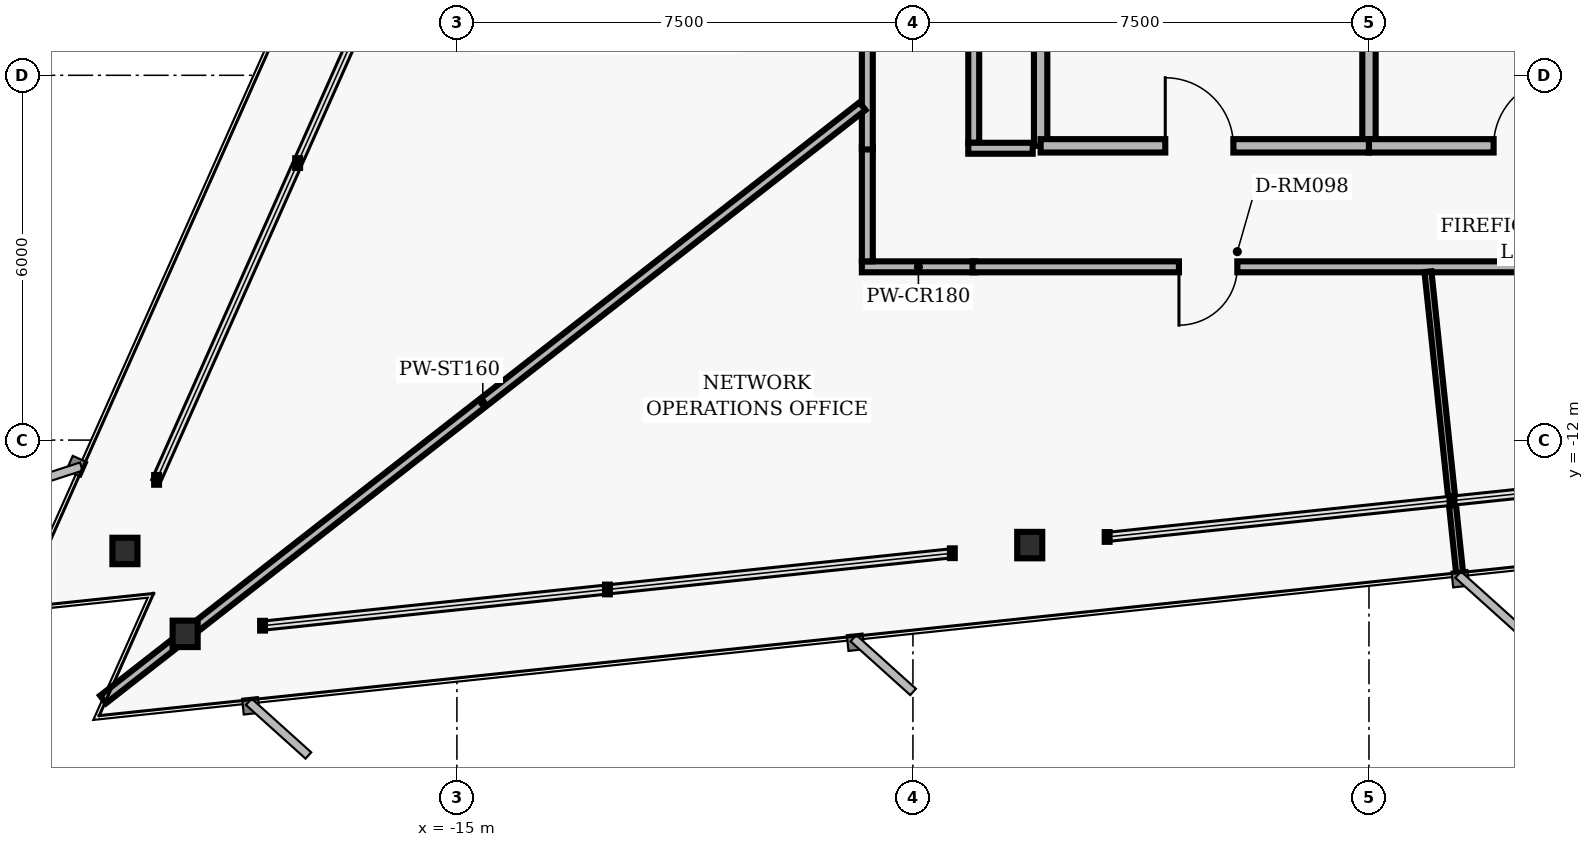
"""IFC4 building model, lengths in metres.
Left out: names, types, materials, properties, quantities, classifications, styles, units other than length and angle.
Written with IfcOpenShell. Run it as: python <this file> out.ifc"""

import sys

from ifc_helpers import new_model, si_unit, direction, frame, frame_2d, origin, origin_2d, place, context, subcontext, project, spatial, rectangle, i_section, extrude, element, fill, save


model = new_model("IFC4")
c1 = context("Model", 3, precision=1e-05, world=origin(), true_north=direction((0.0, 1.0)))
c2 = subcontext(c1, "Body", "Model", "MODEL_VIEW")
j1 = project(units=[si_unit("LENGTHUNIT", "METRE"), si_unit("PLANEANGLEUNIT", "RADIAN")], contexts=[c1])
p1 = place(None, origin())
s1 = spatial("IfcSite", under=j1, at=p1, CompositionType="ELEMENT")
p2 = place(p1, origin())
s2 = spatial("IfcBuilding", under=s1, at=p2, CompositionType="ELEMENT")
p3 = place(p2, frame((0.0, 0.0, 107.68)))
s3 = spatial("IfcBuildingStorey", under=s2, at=p3, CompositionType="ELEMENT", Elevation=107.68)
for number, where, z_axis, x_axis in (
    (1, (-20.46, -13.823, 0.0), (0.0, 0.0, 1.0), (1.0, 0.0, 0.0)),
    (2, (-19.469, -15.187, 0.0), (0.0, 0.0, 1.0), (1.0, 0.0, 0.0)),
    (3, (-5.579, -13.727, 0.0), (0.0, 0.0, 1.0), (1.0, 0.0, 0.0)),
):
    element("IfcColumn", number, at=place(p3, frame(where, z_axis=z_axis, x_axis=x_axis)), inside=s3, PredefinedType="COLUMN", context=c2, shape_type="SweptSolid", body=[
        extrude(i_section(OverallWidth=0.412, OverallDepth=0.435, WebThickness=0.036, FlangeThickness=0.057, FilletRadius=0.022, at=origin_2d()), origin(), (0.0, 0.0, 1.0), 3.04),
    ])
p4 = place(p3, frame((-5.4, -7.16, 0.0), z_axis=(0.0, 0.0, 1.0), x_axis=(0.0, 1.0, 0.0)))
e4 = element("IfcWall", 4, at=p4, inside=s3, PredefinedType="PARTITIONING", context=c2, shape_type="SweptSolid", body=[
    extrude(rectangle(XDim=2.71, YDim=0.22, at=frame_2d((1.355, 0.0))), origin(), (0.0, 0.0, 1.0), 2.763),
])
p5 = place(p3, frame((0.0, -7.16, 0.0), z_axis=(0.0, 0.0, 1.0), x_axis=(0.0, 1.0, 0.0)))
e5 = element("IfcWall", 5, at=p5, inside=s3, PredefinedType="PARTITIONING", context=c2, shape_type="SweptSolid", body=[
    extrude(rectangle(XDim=2.81, YDim=0.22, at=frame_2d((1.405, 0.0))), origin(), (0.0, 0.0, 1.0), 2.763),
])
p6 = place(p3, frame((-5.4, -7.16, 0.0), z_axis=(0.0, 0.0, 1.0), x_axis=(1.0, 0.0, 0.0)))
e6 = element("IfcWall", 6, at=p6, inside=s3, PredefinedType="PARTITIONING", context=c2, shape_type="SweptSolid", body=[
    extrude(rectangle(XDim=5.4, YDim=0.22, at=frame_2d((2.7, 0.0))), origin(), (0.0, 0.0, 1.0), 2.33),
])
p7 = place(p6, frame((2.05, 0.0, 0.0)))
e7 = element("IfcOpeningElement", 7, at=p7, cuts=e6, PredefinedType="OPENING", context=c2, shape_type="SweptSolid", body=[
    extrude(rectangle(XDim=1.12, YDim=2.02, at=frame_2d((0.56, 1.01))), frame((0.0, 0.12, 0.0), z_axis=(0.0, -1.0, 0.0), x_axis=(1.0, 0.0, 0.0)), (0.0, 0.0, 1.0), 0.24),
])
p8 = place(p3, frame((0.0, -7.16, 0.0), z_axis=(0.0, 0.0, 1.0), x_axis=(1.0, 0.0, 0.0)))
e8 = element("IfcWall", 8, at=p8, inside=s3, PredefinedType="PARTITIONING", context=c2, shape_type="SweptSolid", body=[
    extrude(rectangle(XDim=5.4, YDim=0.22, at=frame_2d((2.7, 0.0))), origin(), (0.0, 0.0, 1.0), 2.33),
])
p9 = place(p8, frame((2.05, 0.0, 0.0)))
e9 = element("IfcOpeningElement", 9, at=p9, cuts=e8, PredefinedType="OPENING", context=c2, shape_type="SweptSolid", body=[
    extrude(rectangle(XDim=1.12, YDim=2.02, at=frame_2d((0.56, 1.01))), frame((0.0, 0.12, 0.0), z_axis=(0.0, -1.0, 0.0), x_axis=(1.0, 0.0, 0.0)), (0.0, 0.0, 1.0), 0.24),
])
p10 = place(p3, frame((-6.48, -9.15, 0.0), z_axis=(0.0, 0.0, 1.0), x_axis=(-1.0, 0.0, 0.0)))
e10 = element("IfcWall", 10, at=p10, inside=s3, PredefinedType="PARTITIONING", context=c2, shape_type="SweptSolid", body=[
    extrude(rectangle(XDim=1.86, YDim=0.18, at=frame_2d((0.93, 0.0))), origin(), (0.0, 0.0, 1.0), 2.33),
])
p11 = place(p3, frame((-8.25, -9.06, 0.0), z_axis=(0.0, 0.0, 1.0), x_axis=(0.0, 1.0, 0.0)))
e11 = element("IfcWall", 11, at=p11, inside=s3, PredefinedType="PARTITIONING", context=c2, shape_type="SweptSolid", body=[
    extrude(rectangle(XDim=1.88, YDim=0.18, at=frame_2d((0.94, 0.0))), origin(), (0.0, 0.0, 1.0), 2.763),
])
p12 = place(p3, frame((-8.25, -7.22, 0.0), z_axis=(0.0, 0.0, 1.0), x_axis=(0.0, 1.0, 0.0)))
e12 = element("IfcWall", 12, at=p12, inside=s3, PredefinedType="PARTITIONING", context=c2, shape_type="SweptSolid", body=[
    extrude(rectangle(XDim=14.44, YDim=0.18, at=frame_2d((7.22, 0.0))), origin(), (0.0, 0.0, 1.0), 2.33),
])
p13 = place(p12, frame((3.038, 0.0, 0.0)))
e13 = element("IfcOpeningElement", 13, at=p13, cuts=e12, PredefinedType="OPENING", context=c2, shape_type="SweptSolid", body=[
    extrude(rectangle(XDim=0.96, YDim=2.02, at=frame_2d((0.48, 1.01))), frame((0.0, 0.1, 0.0), z_axis=(0.0, -1.0, 0.0), x_axis=(1.0, 0.0, 0.0)), (0.0, 0.0, 1.0), 0.2),
])
p14 = place(p12, frame((9.456, 0.0, 0.0)))
e14 = element("IfcOpeningElement", 14, at=p14, cuts=e12, PredefinedType="OPENING", context=c2, shape_type="SweptSolid", body=[
    extrude(rectangle(XDim=1.18, YDim=2.02, at=frame_2d((0.59, 1.01))), frame((0.0, 0.1, 0.0), z_axis=(0.0, -1.0, 0.0), x_axis=(1.0, 0.0, 0.0)), (0.0, 0.0, 1.0), 0.2),
])
p15 = place(p3, frame((10.98, -9.15, 0.0), z_axis=(0.0, 0.0, 1.0), x_axis=(-1.0, 0.0, 0.0)))
e15 = element("IfcWall", 15, at=p15, inside=s3, PredefinedType="PARTITIONING", context=c2, shape_type="SweptSolid", body=[
    extrude(rectangle(XDim=17.5, YDim=0.18, at=frame_2d((8.75, 0.0))), origin(), (0.0, 0.0, 1.0), 2.33),
])
p16 = place(p15, frame((13.145, 0.0, 0.0)))
e16 = element("IfcOpeningElement", 16, at=p16, cuts=e15, PredefinedType="OPENING", context=c2, shape_type="SweptSolid", body=[
    extrude(rectangle(XDim=0.96, YDim=2.02, at=frame_2d((0.48, 1.01))), frame((0.0, 0.1, 0.0), z_axis=(0.0, -1.0, 0.0), x_axis=(1.0, 0.0, 0.0)), (0.0, 0.0, 1.0), 0.2),
])
p17 = place(p15, frame((4.655, 0.0, 0.0)))
e17 = element("IfcOpeningElement", 17, at=p17, cuts=e15, PredefinedType="OPENING", context=c2, shape_type="SweptSolid", body=[
    extrude(rectangle(XDim=0.96, YDim=2.02, at=frame_2d((0.48, 1.01))), frame((0.0, 0.1, 0.0), z_axis=(0.0, -1.0, 0.0), x_axis=(1.0, 0.0, 0.0)), (0.0, 0.0, 1.0), 0.2),
])
p18 = place(p3, frame((-6.5, -4.88, 0.0), z_axis=(0.0, 0.0, 1.0), x_axis=(0.0, -1.0, 0.0)))
e18 = element("IfcWall", 18, at=p18, inside=s3, PredefinedType="PARTITIONING", context=c2, shape_type="SweptSolid", body=[
    extrude(rectangle(XDim=2.23, YDim=0.18, at=frame_2d((1.115, 0.0))), origin(), (0.0, 0.0, 1.0), 2.763),
])
p19 = place(p3, frame((-6.59, -7.2, 0.0), z_axis=(0.0, 0.0, 1.0), x_axis=(1.0, 0.0, 0.0)))
e19 = element("IfcWall", 19, at=p19, inside=s3, PredefinedType="PARTITIONING", context=c2, shape_type="SweptSolid", body=[
    extrude(rectangle(XDim=1.06, YDim=0.18, at=frame_2d((0.53, 0.0))), origin(), (0.0, 0.0, 1.0), 2.33),
])
p20 = place(p3, frame((-8.33, -6.508, 0.0), z_axis=(0.0, 0.0, 1.0), x_axis=(-0.788011528275, -0.615660483794, 0.0)))
e20 = element("IfcWall", 20, at=p20, inside=s3, PredefinedType="PARTITIONING", context=c2, shape_type="SweptSolid", body=[
    extrude(rectangle(XDim=15.848, YDim=0.16, at=frame_2d((7.924, 0.0))), origin(), (0.0, 0.0, 1.0), 2.132),
])
p21 = place(p3, frame((0.97, -9.23, 0.0), z_axis=(0.0, 0.0, 1.0), x_axis=(0.104502779655, -0.994524594489, 0.0)))
e21 = element("IfcWall", 21, at=p21, inside=s3, PredefinedType="MOVABLE", context=c2, shape_type="SweptSolid", body=[
    extrude(rectangle(XDim=5.028, YDim=0.115, at=frame_2d((2.514, 0.0))), origin(), (0.0, 0.0, 1.0), 2.763),
])
p22 = place(p7, origin())
e22 = element("IfcDoor", 22, at=p22, inside=s3, OperationType="SINGLE_SWING_LEFT", PredefinedType="DOOR", context=c2, shape_type="SweptSolid", body=[
    extrude(rectangle(XDim=1.12, YDim=2.02, at=frame_2d((0.56, 1.01))), frame((0.0, 0.025, 0.0), z_axis=(0.0, -1.0, 0.0), x_axis=(1.0, 0.0, 0.0)), (0.0, 0.0, 1.0), 0.05),
])
fill(e7, e22)
p23 = place(p9, origin())
e23 = element("IfcDoor", 23, at=p23, inside=s3, OperationType="SINGLE_SWING_RIGHT", PredefinedType="DOOR", context=c2, shape_type="SweptSolid", body=[
    extrude(rectangle(XDim=1.12, YDim=2.02, at=frame_2d((0.56, 1.01))), frame((0.0, 0.025, 0.0), z_axis=(0.0, -1.0, 0.0), x_axis=(1.0, 0.0, 0.0)), (0.0, 0.0, 1.0), 0.05),
])
fill(e9, e23)
p24 = place(p16, origin())
e24 = element("IfcDoor", 24, at=p24, inside=s3, OperationType="SINGLE_SWING_RIGHT", PredefinedType="DOOR", context=c2, shape_type="SweptSolid", body=[
    extrude(rectangle(XDim=0.96, YDim=2.02, at=frame_2d((0.48, 1.01))), frame((0.0, 0.025, 0.0), z_axis=(0.0, -1.0, 0.0), x_axis=(1.0, 0.0, 0.0)), (0.0, 0.0, 1.0), 0.05),
])
fill(e16, e24)
save(model, sys.argv[1])
